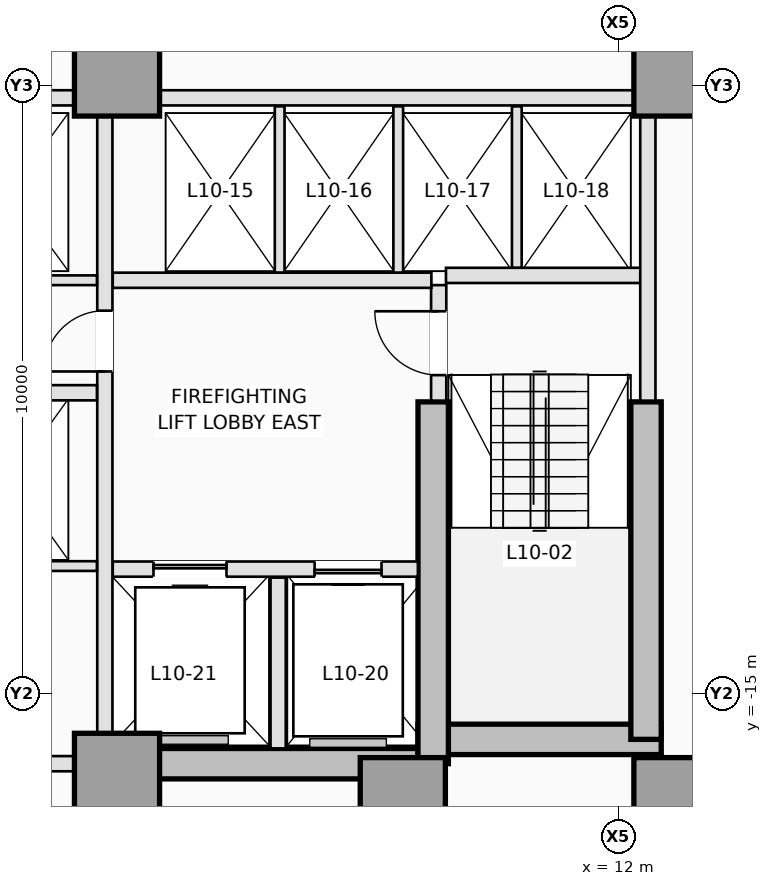
"""IFC4 building model, lengths in metres.
Left out: names, types, materials, properties, quantities, classifications, styles, units other than length and angle.
Written with IfcOpenShell. Run it as: python <this file> out.ifc"""

import sys

from ifc_helpers import new_model, si_unit, direction, frame, frame_2d, origin, origin_2d, place, context, subcontext, project, spatial, rectangle, extrude, element, fill, save


model = new_model("IFC4")
c1 = context("Model", 3, precision=1e-05, world=origin(), true_north=direction((0.0, 1.0)))
c2 = subcontext(c1, "Body", "Model", "MODEL_VIEW")
j1 = project(units=[si_unit("LENGTHUNIT", "METRE"), si_unit("PLANEANGLEUNIT", "RADIAN")], contexts=[c1])
p1 = place(None, origin())
s1 = spatial("IfcSite", under=j1, at=p1, CompositionType="ELEMENT")
p2 = place(p1, origin())
s2 = spatial("IfcBuilding", under=s1, at=p2, CompositionType="ELEMENT")
p3 = place(p2, frame((0.0, 0.0, 41.6)))
s3 = spatial("IfcBuildingStorey", under=s2, at=p3, CompositionType="ELEMENT", Elevation=41.6)
p4 = place(p3, frame((3.75, -16.15, 0.0), z_axis=(0.0, 0.0, 1.0), x_axis=(1.0, 0.0, 0.0)))
e1 = element("IfcWall", 1, at=p4, inside=s3, PredefinedType="SHEAR", context=c2, shape_type="SweptSolid", body=[
    extrude(rectangle(XDim=5.2, YDim=0.5, at=frame_2d((2.6, 0.0))), origin(), (0.0, 0.0, 1.0), 3.5),
])
p5 = place(p3, frame((8.7, -15.75, 0.0), z_axis=(0.0, 0.0, 1.0), x_axis=(1.0, 0.0, 0.0)))
e2 = element("IfcWall", 2, at=p5, inside=s3, PredefinedType="SHEAR", context=c2, shape_type="SweptSolid", body=[
    extrude(rectangle(XDim=4.0, YDim=0.5, at=frame_2d((2.0, 0.0))), origin(), (0.0, 0.0, 1.0), 3.5),
])
p6 = place(p3, frame((12.45, -15.75, 0.0), z_axis=(0.0, 0.0, 1.0), x_axis=(0.0, 1.0, 0.0)))
e3 = element("IfcWall", 3, at=p6, inside=s3, PredefinedType="SHEAR", context=c2, shape_type="SweptSolid", body=[
    extrude(rectangle(XDim=5.55, YDim=0.5, at=frame_2d((2.775, 0.0))), origin(), (0.0, 0.0, 1.0), 3.5),
])
p7 = place(p3, frame((8.95, -16.15, 0.0), z_axis=(0.0, 0.0, 1.0), x_axis=(0.0, 1.0, 0.0)))
e4 = element("IfcWall", 4, at=p7, inside=s3, PredefinedType="SHEAR", context=c2, shape_type="SweptSolid", body=[
    extrude(rectangle(XDim=5.95, YDim=0.5, at=frame_2d((2.975, 0.0))), origin(), (0.0, 0.0, 1.0), 3.5),
])
for number, where, z_axis, x_axis in (
    (5, (3.75, -16.35, 0.0), (0.0, 0.0, 1.0), (1.0, 0.0, 0.0)),
    (6, (8.45, -16.75, 0.0), (0.0, 0.0, 1.0), (1.0, 0.0, 0.0)),
    (7, (12.95, -16.75, 0.0), (0.0, 0.0, 1.0), (1.0, 0.0, 0.0)),
    (8, (3.75, -4.8, 0.0), (0.0, 0.0, 1.0), (1.0, 0.0, 0.0)),
    (9, (12.95, -4.8, 0.0), (0.0, 0.0, 1.0), (1.0, 0.0, 0.0)),
):
    element("IfcColumn", number, at=place(p3, frame(where, z_axis=z_axis, x_axis=x_axis)), inside=s3, PredefinedType="COLUMN", context=c2, shape_type="SweptSolid", body=[
        extrude(rectangle(XDim=1.4, YDim=1.4, at=origin_2d()), origin(), (0.0, 0.0, 1.0), 3.5),
    ])
p8 = place(p3, frame((9.04, -10.18, 0.0), z_axis=(0.0, 0.0, 1.0), x_axis=(0.0, 1.0, 0.0)))
e10 = element("IfcWall", 10, at=p8, inside=s3, PredefinedType="PARTITIONING", context=c2, shape_type="SweptSolid", body=[
    extrude(rectangle(XDim=1.9, YDim=0.25, at=frame_2d((0.95, 0.0))), origin(), (0.0, 0.0, 1.0), 3.25),
])
p9 = place(p8, frame((0.42, 0.0, 0.0)))
e11 = element("IfcOpeningElement", 11, at=p9, cuts=e10, PredefinedType="OPENING", context=c2, shape_type="SweptSolid", body=[
    extrude(rectangle(XDim=1.05, YDim=2.15, at=frame_2d((0.525, 1.075))), frame((0.0, 0.135, 0.0), z_axis=(0.0, -1.0, 0.0), x_axis=(1.0, 0.0, 0.0)), (0.0, 0.0, 1.0), 0.27),
])
p10 = place(p3, frame((9.16, -8.12, 0.0), z_axis=(0.0, 0.0, 1.0), x_axis=(1.0, 0.0, 0.0)))
e12 = element("IfcWall", 12, at=p10, inside=s3, PredefinedType="PARTITIONING", context=c2, shape_type="SweptSolid", body=[
    extrude(rectangle(XDim=3.22, YDim=0.25, at=frame_2d((1.61, 0.0))), origin(), (0.0, 0.0, 1.0), 3.25),
])
p11 = place(p3, frame((12.48, -10.18, 0.0), z_axis=(0.0, 0.0, 1.0), x_axis=(0.0, 1.0, 0.0)))
e13 = element("IfcWall", 13, at=p11, inside=s3, PredefinedType="PARTITIONING", context=c2, shape_type="SweptSolid", body=[
    extrude(rectangle(XDim=4.678, YDim=0.25, at=frame_2d((2.339, 0.0))), origin(), (0.0, 0.0, 1.0), 3.25),
])
p12 = place(p3, frame((3.68, -12.95, 0.0), z_axis=(0.0, 0.0, 1.0), x_axis=(1.0, 0.0, 0.0)))
e14 = element("IfcWall", 14, at=p12, inside=s3, PredefinedType="PARTITIONING", context=c2, shape_type="SweptSolid", body=[
    extrude(rectangle(XDim=5.018, YDim=0.25, at=frame_2d((2.509, 0.0))), origin(), (0.0, 0.0, 1.0), 3.25),
])
p13 = place(p12, frame((3.32, 0.0, 0.0)))
e15 = element("IfcOpeningElement", 15, at=p13, cuts=e14, PredefinedType="OPENING", context=c2, shape_type="SweptSolid", body=[
    extrude(rectangle(XDim=1.1, YDim=2.15, at=frame_2d((0.55, 1.075))), frame((0.0, 0.135, 0.0), z_axis=(0.0, -1.0, 0.0), x_axis=(1.0, 0.0, 0.0)), (0.0, 0.0, 1.0), 0.27),
])
p14 = place(p12, frame((0.67, 0.0, 0.0)))
e16 = element("IfcOpeningElement", 16, at=p14, cuts=e14, PredefinedType="OPENING", context=c2, shape_type="SweptSolid", body=[
    extrude(rectangle(XDim=1.2, YDim=2.15, at=frame_2d((0.6, 1.075))), frame((0.0, 0.135, 0.0), z_axis=(0.0, -1.0, 0.0), x_axis=(1.0, 0.0, 0.0)), (0.0, 0.0, 1.0), 0.27),
])
p15 = place(p3, frame((6.4, -15.898, 0.0), z_axis=(0.0, 0.0, 1.0), x_axis=(0.0, 1.0, 0.0)))
e17 = element("IfcWall", 17, at=p15, inside=s3, PredefinedType="PARTITIONING", context=c2, shape_type="SweptSolid", body=[
    extrude(rectangle(XDim=2.808, YDim=0.25, at=frame_2d((1.404, 0.0))), origin(), (0.0, 0.0, 1.0), 3.25),
])
p16 = place(p3, frame((3.68, -8.2, 0.0), z_axis=(0.0, 0.0, 1.0), x_axis=(1.0, 0.0, 0.0)))
e18 = element("IfcWall", 18, at=p16, inside=s3, PredefinedType="PARTITIONING", context=c2, shape_type="SweptSolid", body=[
    extrude(rectangle(XDim=5.24, YDim=0.25, at=frame_2d((2.62, 0.0))), origin(), (0.0, 0.0, 1.0), 3.25),
])
p17 = place(p3, frame((3.55, -15.648, 0.0), z_axis=(0.0, 0.0, 1.0), x_axis=(0.0, 1.0, 0.0)))
e19 = element("IfcWall", 19, at=p17, inside=s3, PredefinedType="PARTITIONING", context=c2, shape_type="SweptSolid", body=[
    extrude(rectangle(XDim=10.146, YDim=0.25, at=frame_2d((5.073, 0.0))), origin(), (0.0, 0.0, 1.0), 3.25),
])
p18 = place(p17, frame((5.948, 0.0, 0.0)))
e20 = element("IfcOpeningElement", 20, at=p18, cuts=e19, PredefinedType="OPENING", context=c2, shape_type="SweptSolid", body=[
    extrude(rectangle(XDim=1.0, YDim=2.15, at=frame_2d((0.5, 1.075))), frame((0.0, 0.135, 0.0), z_axis=(0.0, -1.0, 0.0), x_axis=(1.0, 0.0, 0.0)), (0.0, 0.0, 1.0), 0.27),
])
p19 = place(p3, frame((4.452, -5.2, 0.0), z_axis=(0.0, 0.0, 1.0), x_axis=(1.0, 0.0, 0.0)))
e21 = element("IfcWall", 21, at=p19, inside=s3, PredefinedType="PARTITIONING", context=c2, shape_type="SweptSolid", body=[
    extrude(rectangle(XDim=7.796, YDim=0.25, at=frame_2d((3.898, 0.0))), origin(), (0.0, 0.0, 1.0), 3.25),
])
p20 = place(p3, frame((0.95, -5.2, 0.0), z_axis=(0.0, 0.0, 1.0), x_axis=(1.0, 0.0, 0.0)))
e22 = element("IfcWall", 22, at=p20, inside=s3, PredefinedType="PARTITIONING", context=c2, shape_type="SweptSolid", body=[
    extrude(rectangle(XDim=2.098, YDim=0.25, at=frame_2d((1.049, 0.0))), origin(), (0.0, 0.0, 1.0), 3.25),
])
for number, where, z_axis, x_axis in (
    (23, (6.425, -8.073, 0.0), (0.0, 0.0, 1.0), (0.0, 1.0, 0.0)),
    (24, (8.375, -8.073, 0.0), (0.0, 0.0, 1.0), (0.0, 1.0, 0.0)),
):
    element("IfcWall", number, at=place(p3, frame(where, z_axis=z_axis, x_axis=x_axis)), inside=s3, PredefinedType="PARTITIONING", context=c2, shape_type="SweptSolid", body=[
        extrude(rectangle(XDim=2.733, YDim=0.16, at=frame_2d((1.366, 0.0))), origin(), (0.0, 0.0, 1.0), 3.25),
    ])
p21 = place(p3, frame((10.325, -7.993, 0.0), z_axis=(0.0, 0.0, 1.0), x_axis=(0.0, 1.0, 0.0)))
e25 = element("IfcWall", 25, at=p21, inside=s3, PredefinedType="PARTITIONING", context=c2, shape_type="SweptSolid", body=[
    extrude(rectangle(XDim=2.653, YDim=0.16, at=frame_2d((1.326, 0.0))), origin(), (0.0, 0.0, 1.0), 3.25),
])
p22 = place(p3, frame((-3.048, -16.15, 0.0), z_axis=(0.0, 0.0, 1.0), x_axis=(1.0, 0.0, 0.0)))
e26 = element("IfcWall", 26, at=p22, inside=s3, PredefinedType="PARTITIONING", context=c2, shape_type="SweptSolid", body=[
    extrude(rectangle(XDim=6.096, YDim=0.25, at=frame_2d((3.048, 0.0))), origin(), (0.0, 0.0, 1.0), 2.3),
])
p23 = place(p3, frame((0.95, -8.2, 0.0), z_axis=(0.0, 0.0, 1.0), x_axis=(1.0, 0.0, 0.0)))
e27 = element("IfcWall", 27, at=p23, inside=s3, PredefinedType="PARTITIONING", context=c2, shape_type="SweptSolid", body=[
    extrude(rectangle(XDim=2.47, YDim=0.16, at=frame_2d((1.235, 0.0))), origin(), (0.0, 0.0, 1.0), 3.25),
])
p24 = place(p3, frame((0.95, -10.05, 0.0), z_axis=(0.0, 0.0, 1.0), x_axis=(1.0, 0.0, 0.0)))
e28 = element("IfcWall", 28, at=p24, inside=s3, PredefinedType="PARTITIONING", context=c2, shape_type="SweptSolid", body=[
    extrude(rectangle(XDim=2.47, YDim=0.25, at=frame_2d((1.235, 0.0))), origin(), (0.0, 0.0, 1.0), 3.25),
])
p25 = place(p3, frame((-3.42, -12.9, 0.0), z_axis=(0.0, 0.0, 1.0), x_axis=(1.0, 0.0, 0.0)))
e29 = element("IfcWall", 29, at=p25, inside=s3, PredefinedType="PARTITIONING", context=c2, shape_type="SweptSolid", body=[
    extrude(rectangle(XDim=6.84, YDim=0.16, at=frame_2d((3.42, 0.0))), origin(), (0.0, 0.0, 1.0), 3.25),
])
p26 = place(p25, frame((2.98, 0.0, 0.0)))
e30 = element("IfcOpeningElement", 30, at=p26, cuts=e29, PredefinedType="OPENING", context=c2, shape_type="SweptSolid", body=[
    extrude(rectangle(XDim=0.88, YDim=2.12, at=frame_2d((0.44, 1.06))), frame((0.0, 0.09, 0.0), z_axis=(0.0, -1.0, 0.0), x_axis=(1.0, 0.0, 0.0)), (0.0, 0.0, 1.0), 0.18),
])
p27 = place(p13, origin())
e31 = element("IfcDoor", 31, at=p27, inside=s3, OperationType="SLIDING_TO_RIGHT", PredefinedType="DOOR", context=c2, shape_type="SweptSolid", body=[
    extrude(rectangle(XDim=1.1, YDim=2.15, at=frame_2d((0.55, 1.075))), frame((0.0, 0.025, 0.0), z_axis=(0.0, -1.0, 0.0), x_axis=(1.0, 0.0, 0.0)), (0.0, 0.0, 1.0), 0.05),
])
fill(e15, e31)
p28 = place(p14, origin())
e32 = element("IfcDoor", 32, at=p28, inside=s3, OperationType="SLIDING_TO_LEFT", PredefinedType="DOOR", context=c2, shape_type="SweptSolid", body=[
    extrude(rectangle(XDim=1.2, YDim=2.15, at=frame_2d((0.6, 1.075))), frame((0.0, 0.025, 0.0), z_axis=(0.0, -1.0, 0.0), x_axis=(1.0, 0.0, 0.0)), (0.0, 0.0, 1.0), 0.05),
])
fill(e16, e32)
p29 = place(p9, origin())
e33 = element("IfcDoor", 33, at=p29, inside=s3, OperationType="SINGLE_SWING_RIGHT", PredefinedType="DOOR", context=c2, shape_type="SweptSolid", body=[
    extrude(rectangle(XDim=1.05, YDim=2.15, at=frame_2d((0.525, 1.075))), frame((0.0, 0.025, 0.0), z_axis=(0.0, -1.0, 0.0), x_axis=(1.0, 0.0, 0.0)), (0.0, 0.0, 1.0), 0.05),
])
fill(e11, e33)
p30 = place(p18, origin())
e34 = element("IfcDoor", 34, at=p30, inside=s3, OperationType="SINGLE_SWING_LEFT", PredefinedType="DOOR", context=c2, shape_type="SweptSolid", body=[
    extrude(rectangle(XDim=1.0, YDim=2.15, at=frame_2d((0.5, 1.075))), frame((0.0, 0.025, 0.0), z_axis=(0.0, -1.0, 0.0), x_axis=(1.0, 0.0, 0.0)), (0.0, 0.0, 1.0), 0.05),
])
fill(e20, e34)
save(model, sys.argv[1])
